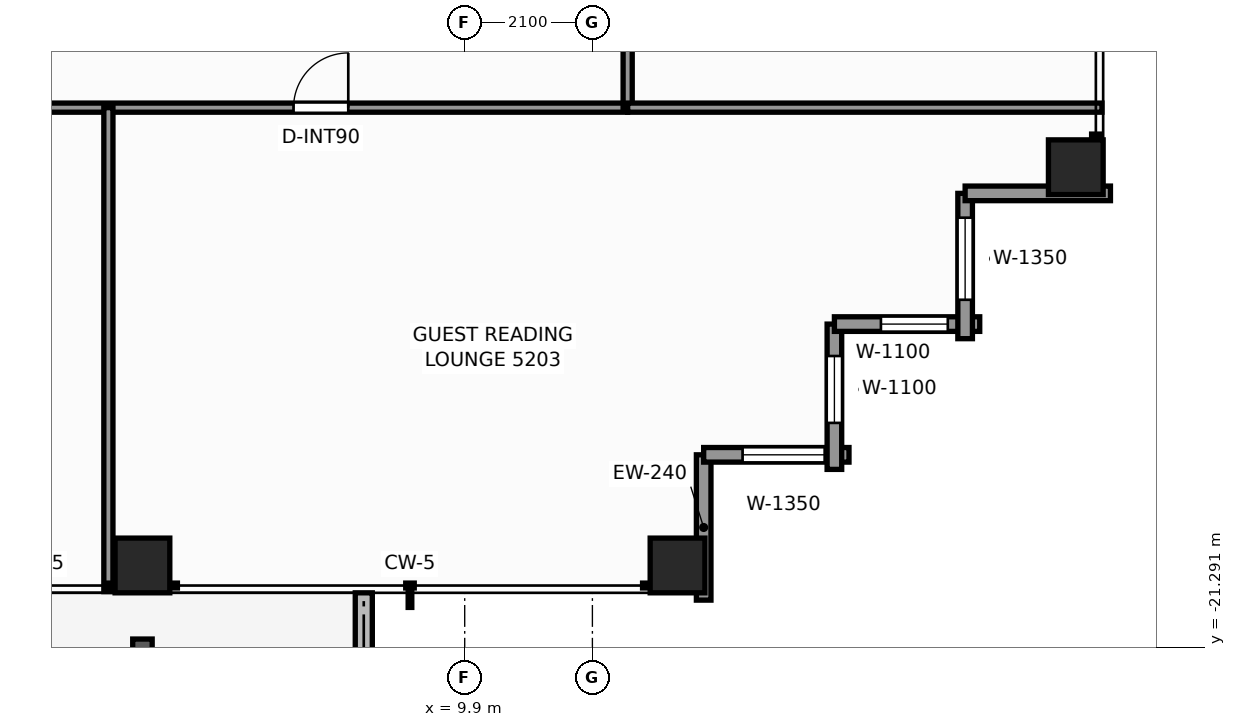
"""IFC4 building model, lengths in metres.
Left out: names, types, materials, properties, quantities, classifications, styles, units other than length and angle.
Written with IfcOpenShell. Run it as: python <this file> out.ifc"""

import sys

from ifc_helpers import new_model, si_unit, direction, frame, frame_2d, origin, origin_2d, place, context, subcontext, project, spatial, rectangle, extrude, element, fill, save


model = new_model("IFC4")
c1 = context("Model", 3, precision=1e-05, world=origin(), true_north=direction((0.0, 1.0)))
c2 = subcontext(c1, "Body", "Model", "MODEL_VIEW")
j1 = project(units=[si_unit("LENGTHUNIT", "METRE"), si_unit("PLANEANGLEUNIT", "RADIAN")], contexts=[c1])
p1 = place(None, origin())
s1 = spatial("IfcSite", under=j1, at=p1, CompositionType="ELEMENT")
p2 = place(p1, origin())
s2 = spatial("IfcBuilding", under=s1, at=p2, CompositionType="ELEMENT")
p3 = place(p2, frame((0.0, 0.0, 180.0)))
s3 = spatial("IfcBuildingStorey", under=s2, at=p3, CompositionType="ELEMENT", Elevation=180.0)
for number, where, z_axis, x_axis in (
    (1, (4.6, -19.95, 0.0), (0.0, 0.0, 1.0), (1.0, 0.0, 0.0)),
    (2, (13.4, -19.95, 0.0), (0.0, 0.0, 1.0), (1.0, 0.0, 0.0)),
    (3, (19.95, -13.4, 0.0), (0.0, 0.0, 1.0), (1.0, 0.0, 0.0)),
):
    element("IfcColumn", number, at=place(p3, frame(where, z_axis=z_axis, x_axis=x_axis)), inside=s3, PredefinedType="COLUMN", context=c2, shape_type="SweptSolid", body=[
        extrude(rectangle(XDim=0.9, YDim=0.9, at=origin_2d()), origin(), (0.0, 0.0, 1.0), 3.3),
    ])
p4 = place(p3, frame((8.24, -23.074, -0.04), z_axis=(0.0, 0.0, 1.0), x_axis=(0.0, 1.0, 0.0)))
e4 = element("IfcWall", 4, at=p4, inside=s3, PredefinedType="PARAPET", context=c2, shape_type="SweptSolid", body=[
    extrude(rectangle(XDim=2.674, YDim=0.28, at=frame_2d((1.337, 0.0))), origin(), (0.0, 0.0, 1.0), 0.42),
])
p5 = place(p3, frame((13.83, -18.13, 0.0), z_axis=(0.0, 0.0, 1.0), x_axis=(0.0, -1.0, 0.0)))
e5 = element("IfcWall", 5, at=p5, inside=s3, PredefinedType="STANDARD", context=c2, shape_type="SweptSolid", body=[
    extrude(rectangle(XDim=2.39, YDim=0.24, at=frame_2d((1.195, 0.0))), origin(), (0.0, 0.0, 1.0), 2.463),
])
p6 = place(p3, frame((16.22, -18.13, 0.0), z_axis=(0.0, 0.0, 1.0), x_axis=(-1.0, 0.0, 0.0)))
e6 = element("IfcWall", 6, at=p6, inside=s3, PredefinedType="STANDARD", context=c2, shape_type="SweptSolid", body=[
    extrude(rectangle(XDim=2.39, YDim=0.24, at=frame_2d((1.195, 0.0))), origin(), (0.0, 0.0, 1.0), 2.463),
])
p7 = place(p6, frame((0.4, 0.0, 0.65)))
e7 = element("IfcOpeningElement", 7, at=p7, cuts=e6, PredefinedType="OPENING", context=c2, shape_type="SweptSolid", body=[
    extrude(rectangle(XDim=1.35, YDim=1.55, at=frame_2d((0.675, 0.775))), frame((0.0, 0.13, 0.0), z_axis=(0.0, -1.0, 0.0), x_axis=(1.0, 0.0, 0.0)), (0.0, 0.0, 1.0), 0.26),
])
p8 = place(p3, frame((15.98, -15.98, 0.0), z_axis=(0.0, 0.0, 1.0), x_axis=(0.0, -1.0, 0.0)))
e8 = element("IfcWall", 8, at=p8, inside=s3, PredefinedType="STANDARD", context=c2, shape_type="SweptSolid", body=[
    extrude(rectangle(XDim=2.39, YDim=0.24, at=frame_2d((1.195, 0.0))), origin(), (0.0, 0.0, 1.0), 2.463),
])
p9 = place(p8, frame((0.525, 0.0, 0.65)))
e9 = element("IfcOpeningElement", 9, at=p9, cuts=e8, PredefinedType="OPENING", context=c2, shape_type="SweptSolid", body=[
    extrude(rectangle(XDim=1.1, YDim=1.45, at=frame_2d((0.55, 0.725))), frame((0.0, 0.13, 0.0), z_axis=(0.0, -1.0, 0.0), x_axis=(1.0, 0.0, 0.0)), (0.0, 0.0, 1.0), 0.26),
])
p10 = place(p3, frame((18.37, -15.98, 0.0), z_axis=(0.0, 0.0, 1.0), x_axis=(-1.0, 0.0, 0.0)))
e10 = element("IfcWall", 10, at=p10, inside=s3, PredefinedType="STANDARD", context=c2, shape_type="SweptSolid", body=[
    extrude(rectangle(XDim=2.39, YDim=0.24, at=frame_2d((1.195, 0.0))), origin(), (0.0, 0.0, 1.0), 2.463),
])
p11 = place(p10, frame((0.525, 0.0, 0.65)))
e11 = element("IfcOpeningElement", 11, at=p11, cuts=e10, PredefinedType="OPENING", context=c2, shape_type="SweptSolid", body=[
    extrude(rectangle(XDim=1.1, YDim=1.45, at=frame_2d((0.55, 0.725))), frame((0.0, 0.13, 0.0), z_axis=(0.0, -1.0, 0.0), x_axis=(1.0, 0.0, 0.0)), (0.0, 0.0, 1.0), 0.26),
])
p12 = place(p3, frame((18.13, -13.83, 0.0), z_axis=(0.0, 0.0, 1.0), x_axis=(0.0, -1.0, 0.0)))
e12 = element("IfcWall", 12, at=p12, inside=s3, PredefinedType="STANDARD", context=c2, shape_type="SweptSolid", body=[
    extrude(rectangle(XDim=2.39, YDim=0.24, at=frame_2d((1.195, 0.0))), origin(), (0.0, 0.0, 1.0), 2.463),
])
p13 = place(p12, frame((0.4, 0.0, 0.65)))
e13 = element("IfcOpeningElement", 13, at=p13, cuts=e12, PredefinedType="OPENING", context=c2, shape_type="SweptSolid", body=[
    extrude(rectangle(XDim=1.35, YDim=1.55, at=frame_2d((0.675, 0.775))), frame((0.0, 0.13, 0.0), z_axis=(0.0, -1.0, 0.0), x_axis=(1.0, 0.0, 0.0)), (0.0, 0.0, 1.0), 0.26),
])
p14 = place(p3, frame((20.52, -13.83, 0.0), z_axis=(0.0, 0.0, 1.0), x_axis=(-1.0, 0.0, 0.0)))
e14 = element("IfcWall", 14, at=p14, inside=s3, PredefinedType="STANDARD", context=c2, shape_type="SweptSolid", body=[
    extrude(rectangle(XDim=2.39, YDim=0.24, at=frame_2d((1.195, 0.0))), origin(), (0.0, 0.0, 1.0), 2.463),
])
p15 = place(p3, frame((-12.26, -12.42, 0.0), z_axis=(0.0, 0.0, 1.0), x_axis=(1.0, 0.0, 0.0)))
e15 = element("IfcWall", 15, at=p15, inside=s3, PredefinedType="PARTITIONING", context=c2, shape_type="SweptSolid", body=[
    extrude(rectangle(XDim=24.84, YDim=0.15, at=frame_2d((12.42, 0.0))), origin(), (0.0, 0.0, 1.0), 2.369),
])
p16 = place(p15, frame((4.275, 0.0, 0.0)))
e16 = element("IfcOpeningElement", 16, at=p16, cuts=e15, PredefinedType="OPENING", context=c2, shape_type="SweptSolid", body=[
    extrude(rectangle(XDim=0.9, YDim=2.06, at=frame_2d((0.45, 1.03))), frame((0.0, 0.085, 0.0), z_axis=(0.0, -1.0, 0.0), x_axis=(1.0, 0.0, 0.0)), (0.0, 0.0, 1.0), 0.17),
])
p17 = place(p15, frame((13.84, 0.0, 0.0)))
e17 = element("IfcOpeningElement", 17, at=p17, cuts=e15, PredefinedType="OPENING", context=c2, shape_type="SweptSolid", body=[
    extrude(rectangle(XDim=0.9, YDim=2.06, at=frame_2d((0.45, 1.03))), frame((0.0, 0.085, 0.0), z_axis=(0.0, -1.0, 0.0), x_axis=(1.0, 0.0, 0.0)), (0.0, 0.0, 1.0), 0.17),
])
p18 = place(p15, frame((19.345, 0.0, 0.0)))
e18 = element("IfcOpeningElement", 18, at=p18, cuts=e15, PredefinedType="OPENING", context=c2, shape_type="SweptSolid", body=[
    extrude(rectangle(XDim=0.9, YDim=2.06, at=frame_2d((0.45, 1.03))), frame((0.0, 0.085, 0.0), z_axis=(0.0, -1.0, 0.0), x_axis=(1.0, 0.0, 0.0)), (0.0, 0.0, 1.0), 0.17),
])
p19 = place(p3, frame((12.58, -12.42, 0.0), z_axis=(0.0, 0.0, 1.0), x_axis=(0.0, 1.0, 0.0)))
e19 = element("IfcWall", 19, at=p19, inside=s3, PredefinedType="PARTITIONING", context=c2, shape_type="SweptSolid", body=[
    extrude(rectangle(XDim=24.84, YDim=0.15, at=frame_2d((12.42, 0.0))), origin(), (0.0, 0.0, 1.0), 2.369),
])
p20 = place(p19, frame((3.024, 0.0, 0.0)))
e20 = element("IfcOpeningElement", 20, at=p20, cuts=e19, PredefinedType="OPENING", context=c2, shape_type="SweptSolid", body=[
    extrude(rectangle(XDim=0.9, YDim=2.06, at=frame_2d((0.45, 1.03))), frame((0.0, 0.085, 0.0), z_axis=(0.0, -1.0, 0.0), x_axis=(1.0, 0.0, 0.0)), (0.0, 0.0, 1.0), 0.17),
])
p21 = place(p19, frame((5.359, 0.0, 0.0)))
e21 = element("IfcOpeningElement", 21, at=p21, cuts=e19, PredefinedType="OPENING", context=c2, shape_type="SweptSolid", body=[
    extrude(rectangle(XDim=0.9, YDim=2.06, at=frame_2d((0.45, 1.03))), frame((0.0, 0.085, 0.0), z_axis=(0.0, -1.0, 0.0), x_axis=(1.0, 0.0, 0.0)), (0.0, 0.0, 1.0), 0.17),
])
p22 = place(p19, frame((11.067, 0.0, 0.0)))
e22 = element("IfcOpeningElement", 22, at=p22, cuts=e19, PredefinedType="OPENING", context=c2, shape_type="SweptSolid", body=[
    extrude(rectangle(XDim=0.95, YDim=2.06, at=frame_2d((0.475, 1.03))), frame((0.0, 0.085, 0.0), z_axis=(0.0, -1.0, 0.0), x_axis=(1.0, 0.0, 0.0)), (0.0, 0.0, 1.0), 0.17),
])
p23 = place(p19, frame((18.038, 0.0, 0.0)))
e23 = element("IfcOpeningElement", 23, at=p23, cuts=e19, PredefinedType="OPENING", context=c2, shape_type="SweptSolid", body=[
    extrude(rectangle(XDim=0.95, YDim=2.06, at=frame_2d((0.475, 1.03))), frame((0.0, 0.085, 0.0), z_axis=(0.0, -1.0, 0.0), x_axis=(1.0, 0.0, 0.0)), (0.0, 0.0, 1.0), 0.17),
])
p24 = place(p19, frame((20.184, 0.0, 0.0)))
e24 = element("IfcOpeningElement", 24, at=p24, cuts=e19, PredefinedType="OPENING", context=c2, shape_type="SweptSolid", body=[
    extrude(rectangle(XDim=0.95, YDim=2.06, at=frame_2d((0.475, 1.03))), frame((0.0, 0.085, 0.0), z_axis=(0.0, -1.0, 0.0), x_axis=(1.0, 0.0, 0.0)), (0.0, 0.0, 1.0), 0.17),
])
p25 = place(p3, frame((12.58, -12.42, 0.0), z_axis=(0.0, 0.0, 1.0), x_axis=(1.0, 0.0, 0.0)))
e25 = element("IfcWall", 25, at=p25, inside=s3, PredefinedType="PARTITIONING", context=c2, shape_type="SweptSolid", body=[
    extrude(rectangle(XDim=7.8, YDim=0.15, at=frame_2d((3.9, 0.0))), origin(), (0.0, 0.0, 1.0), 2.369),
])
p26 = place(p3, frame((4.04, -20.38, 0.0), z_axis=(0.0, 0.0, 1.0), x_axis=(0.0, 1.0, 0.0)))
e26 = element("IfcWall", 26, at=p26, inside=s3, PredefinedType="PARTITIONING", context=c2, shape_type="SweptSolid", body=[
    extrude(rectangle(XDim=7.96, YDim=0.15, at=frame_2d((3.98, 0.0))), origin(), (0.0, 0.0, 1.0), 2.453),
])
p27 = place(p7, origin())
e27 = element("IfcWindow", 27, at=p27, inside=s3, PartitioningType="SINGLE_PANEL", PredefinedType="WINDOW", context=c2, shape_type="SweptSolid", body=[
    extrude(rectangle(XDim=1.35, YDim=1.55, at=frame_2d((0.675, 0.775))), frame((0.0, 0.03, 0.0), z_axis=(0.0, -1.0, 0.0), x_axis=(1.0, 0.0, 0.0)), (0.0, 0.0, 1.0), 0.06),
])
fill(e7, e27)
p28 = place(p9, origin())
e28 = element("IfcWindow", 28, at=p28, inside=s3, PartitioningType="SINGLE_PANEL", PredefinedType="WINDOW", context=c2, shape_type="SweptSolid", body=[
    extrude(rectangle(XDim=1.1, YDim=1.45, at=frame_2d((0.55, 0.725))), frame((0.0, 0.03, 0.0), z_axis=(0.0, -1.0, 0.0), x_axis=(1.0, 0.0, 0.0)), (0.0, 0.0, 1.0), 0.06),
])
fill(e9, e28)
p29 = place(p11, origin())
e29 = element("IfcWindow", 29, at=p29, inside=s3, PartitioningType="SINGLE_PANEL", PredefinedType="WINDOW", context=c2, shape_type="SweptSolid", body=[
    extrude(rectangle(XDim=1.1, YDim=1.45, at=frame_2d((0.55, 0.725))), frame((0.0, 0.03, 0.0), z_axis=(0.0, -1.0, 0.0), x_axis=(1.0, 0.0, 0.0)), (0.0, 0.0, 1.0), 0.06),
])
fill(e11, e29)
p30 = place(p13, origin())
e30 = element("IfcWindow", 30, at=p30, inside=s3, PartitioningType="SINGLE_PANEL", PredefinedType="WINDOW", context=c2, shape_type="SweptSolid", body=[
    extrude(rectangle(XDim=1.35, YDim=1.55, at=frame_2d((0.675, 0.775))), frame((0.0, 0.03, 0.0), z_axis=(0.0, -1.0, 0.0), x_axis=(1.0, 0.0, 0.0)), (0.0, 0.0, 1.0), 0.06),
])
fill(e13, e30)
p31 = place(p18, origin())
e31 = element("IfcDoor", 31, at=p31, inside=s3, OperationType="SINGLE_SWING_RIGHT", PredefinedType="DOOR", context=c2, shape_type="SweptSolid", body=[
    extrude(rectangle(XDim=0.9, YDim=2.06, at=frame_2d((0.45, 1.03))), frame((0.0, 0.025, 0.0), z_axis=(0.0, -1.0, 0.0), x_axis=(1.0, 0.0, 0.0)), (0.0, 0.0, 1.0), 0.05),
])
fill(e18, e31)
save(model, sys.argv[1])
